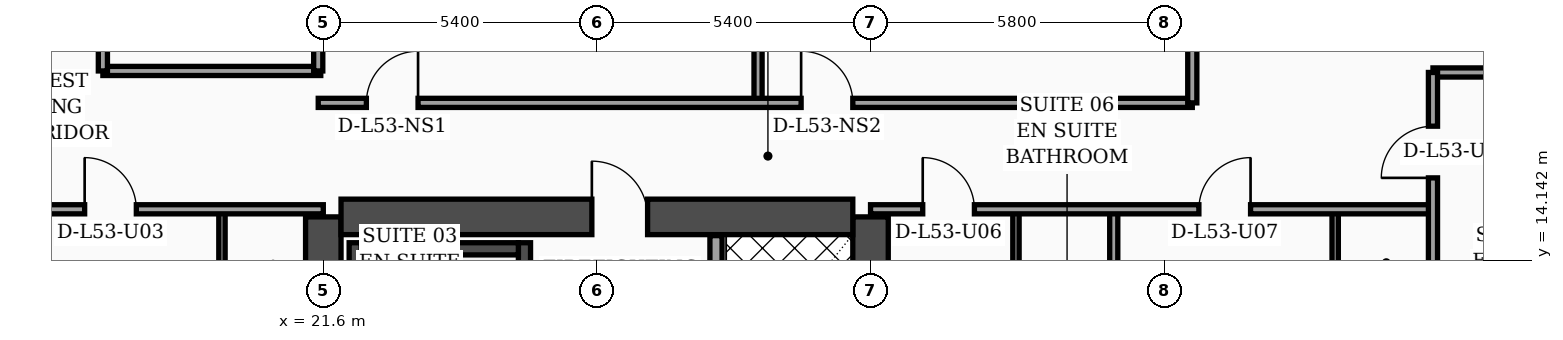
"""IFC4 building model, lengths in metres.
Left out: names, types, materials, properties, quantities, classifications, styles, units other than length and angle.
Written with IfcOpenShell. Run it as: python <this file> out.ifc"""

import sys

from ifc_helpers import new_model, si_unit, direction, frame, frame_2d, origin, place, context, subcontext, project, spatial, rectangle, extrude, element, fill, save


model = new_model("IFC4")
c1 = context("Model", 3, precision=1e-05, world=origin(), true_north=direction((0.0, 1.0)))
c2 = subcontext(c1, "Body", "Model", "MODEL_VIEW")
j1 = project(units=[si_unit("LENGTHUNIT", "METRE"), si_unit("PLANEANGLEUNIT", "RADIAN")], contexts=[c1])
p1 = place(None, origin())
s1 = spatial("IfcSite", under=j1, at=p1, CompositionType="ELEMENT")
p2 = place(p1, origin())
s2 = spatial("IfcBuilding", under=s1, at=p2, CompositionType="ELEMENT")
p3 = place(p2, frame((0.0, 0.0, 214.8)))
s3 = spatial("IfcBuildingStorey", under=s2, at=p3, CompositionType="ELEMENT", Elevation=214.8)
for number, where, z_axis, x_axis in (
    (1, (21.6, 4.6, 0.0), (0.0, 0.0, 1.0), (0.0, 1.0, 0.0)),
    (2, (32.4, 4.6, 0.0), (0.0, 0.0, 1.0), (0.0, 1.0, 0.0)),
):
    element("IfcWall", number, at=place(p3, frame(where, z_axis=z_axis, x_axis=x_axis)), inside=s3, PredefinedType="SHEAR", context=c2, shape_type="SweptSolid", body=[
        extrude(rectangle(XDim=10.4, YDim=0.7, at=frame_2d((5.2, 0.0))), origin(), (0.0, 0.0, 1.0), 4.05),
    ])
p4 = place(p3, frame((21.95, 15.0, 0.0), z_axis=(0.0, 0.0, 1.0), x_axis=(1.0, 0.0, 0.0)))
e3 = element("IfcWall", 3, at=p4, inside=s3, PredefinedType="SHEAR", context=c2, shape_type="SweptSolid", body=[
    extrude(rectangle(XDim=10.1, YDim=0.7, at=frame_2d((5.05, 0.0))), origin(), (0.0, 0.0, 1.0), 4.05),
])
p5 = place(p4, frame((4.95, 0.0, 0.0)))
e4 = element("IfcOpeningElement", 4, at=p5, cuts=e3, PredefinedType="OPENING", context=c2, shape_type="SweptSolid", body=[
    extrude(rectangle(XDim=1.1, YDim=2.2, at=frame_2d((0.55, 1.1))), frame((0.0, 0.36, 0.0), z_axis=(0.0, -1.0, 0.0), x_axis=(1.0, 0.0, 0.0)), (0.0, 0.0, 1.0), 0.72),
])
p6 = place(p3, frame((22.23, 4.95, 0.0), z_axis=(0.0, 0.0, 1.0), x_axis=(0.0, 1.0, 0.0)))
e5 = element("IfcWall", 5, at=p6, inside=s3, PredefinedType="SOLIDWALL", context=c2, shape_type="SweptSolid", body=[
    extrude(rectangle(XDim=9.54, YDim=0.24, at=frame_2d((4.77, 0.0))), origin(), (0.0, 0.0, 1.0), 4.05),
])
p7 = place(p3, frame((25.57, 4.95, 0.0), z_axis=(0.0, 0.0, 1.0), x_axis=(0.0, 1.0, 0.0)))
e6 = element("IfcWall", 6, at=p7, inside=s3, PredefinedType="SOLIDWALL", context=c2, shape_type="SweptSolid", body=[
    extrude(rectangle(XDim=9.54, YDim=0.24, at=frame_2d((4.77, 0.0))), origin(), (0.0, 0.0, 1.0), 4.05),
])
p8 = place(p7, frame((0.35, 0.0, 0.0)))
e7 = element("IfcOpeningElement", 7, at=p8, cuts=e6, PredefinedType="OPENING", context=c2, shape_type="SweptSolid", body=[
    extrude(rectangle(XDim=1.15, YDim=2.2, at=frame_2d((0.575, 1.1))), frame((0.0, 0.13, 0.0), z_axis=(0.0, -1.0, 0.0), x_axis=(1.0, 0.0, 0.0)), (0.0, 0.0, 1.0), 0.26),
])
p9 = place(p3, frame((22.35, 14.37, 0.0), z_axis=(0.0, 0.0, 1.0), x_axis=(1.0, 0.0, 0.0)))
e8 = element("IfcWall", 8, at=p9, inside=s3, PredefinedType="SOLIDWALL", context=c2, shape_type="SweptSolid", body=[
    extrude(rectangle(XDim=3.1, YDim=0.24, at=frame_2d((1.55, 0.0))), origin(), (0.0, 0.0, 1.0), 4.05),
])
p10 = place(p3, frame((52.23, 5.505, 0.0), z_axis=(0.0, 0.0, 1.0), x_axis=(-0.300509063924, 0.953778958931, 0.0)))
e9 = element("IfcWall", 9, at=p10, inside=s3, PredefinedType="SOLIDWALL", context=c2, shape_type="SweptSolid", body=[
    extrude(rectangle(XDim=30.814, YDim=0.32, at=frame_2d((15.407, 0.0))), origin(), (0.0, 0.0, 1.0), 4.05),
])
p11 = place(p10, frame((4.747, 0.0, 0.0)))
e10 = element("IfcOpeningElement", 10, at=p11, cuts=e9, PredefinedType="OPENING", context=c2, shape_type="SweptSolid", body=[
    extrude(rectangle(XDim=1.4, YDim=2.25, at=frame_2d((0.7, 1.125))), frame((0.0, 0.17, 0.0), z_axis=(0.0, -1.0, 0.0), x_axis=(1.0, 0.0, 0.0)), (0.0, 0.0, 1.0), 0.34),
])
p12 = place(p10, frame((9.889, 0.0, 0.7)))
e11 = element("IfcOpeningElement", 11, at=p12, cuts=e9, PredefinedType="OPENING", context=c2, shape_type="SweptSolid", body=[
    extrude(rectangle(XDim=1.6, YDim=1.65, at=frame_2d((0.8, 0.825))), frame((0.0, 0.17, 0.0), z_axis=(0.0, -1.0, 0.0), x_axis=(1.0, 0.0, 0.0)), (0.0, 0.0, 1.0), 0.34),
])
p13 = place(p10, frame((18.696, 0.0, 0.7)))
e12 = element("IfcOpeningElement", 12, at=p13, cuts=e9, PredefinedType="OPENING", context=c2, shape_type="SweptSolid", body=[
    extrude(rectangle(XDim=1.6, YDim=1.65, at=frame_2d((0.8, 0.825))), frame((0.0, 0.17, 0.0), z_axis=(0.0, -1.0, 0.0), x_axis=(1.0, 0.0, 0.0)), (0.0, 0.0, 1.0), 0.34),
])
p14 = place(p10, frame((2.65, 0.0, 0.75)))
e13 = element("IfcOpeningElement", 13, at=p14, cuts=e9, PredefinedType="OPENING", context=c2, shape_type="SweptSolid", body=[
    extrude(rectangle(XDim=1.5, YDim=1.6, at=frame_2d((0.75, 0.8))), frame((0.0, 0.17, 0.0), z_axis=(0.0, -1.0, 0.0), x_axis=(1.0, 0.0, 0.0)), (0.0, 0.0, 1.0), 0.34),
])
p15 = place(p10, frame((7.8, 0.0, 0.75)))
e14 = element("IfcOpeningElement", 14, at=p15, cuts=e9, PredefinedType="OPENING", context=c2, shape_type="SweptSolid", body=[
    extrude(rectangle(XDim=1.5, YDim=1.6, at=frame_2d((0.75, 0.8))), frame((0.0, 0.17, 0.0), z_axis=(0.0, -1.0, 0.0), x_axis=(1.0, 0.0, 0.0)), (0.0, 0.0, 1.0), 0.34),
])
p16 = place(p10, frame((14.0, 0.0, 0.75)))
e15 = element("IfcOpeningElement", 15, at=p16, cuts=e9, PredefinedType="OPENING", context=c2, shape_type="SweptSolid", body=[
    extrude(rectangle(XDim=1.5, YDim=1.6, at=frame_2d((0.75, 0.8))), frame((0.0, 0.17, 0.0), z_axis=(0.0, -1.0, 0.0), x_axis=(1.0, 0.0, 0.0)), (0.0, 0.0, 1.0), 0.34),
])
p17 = place(p10, frame((16.55, 0.0, 0.75)))
e16 = element("IfcOpeningElement", 16, at=p17, cuts=e9, PredefinedType="OPENING", context=c2, shape_type="SweptSolid", body=[
    extrude(rectangle(XDim=1.5, YDim=1.6, at=frame_2d((0.75, 0.8))), frame((0.0, 0.17, 0.0), z_axis=(0.0, -1.0, 0.0), x_axis=(1.0, 0.0, 0.0)), (0.0, 0.0, 1.0), 0.34),
])
p18 = place(p10, frame((20.75, 0.0, 0.75)))
e17 = element("IfcOpeningElement", 17, at=p18, cuts=e9, PredefinedType="OPENING", context=c2, shape_type="SweptSolid", body=[
    extrude(rectangle(XDim=1.5, YDim=1.6, at=frame_2d((0.75, 0.8))), frame((0.0, 0.17, 0.0), z_axis=(0.0, -1.0, 0.0), x_axis=(1.0, 0.0, 0.0)), (0.0, 0.0, 1.0), 0.34),
])
p19 = place(p10, frame((23.3, 0.0, 0.75)))
e18 = element("IfcOpeningElement", 18, at=p19, cuts=e9, PredefinedType="OPENING", context=c2, shape_type="SweptSolid", body=[
    extrude(rectangle(XDim=1.5, YDim=1.6, at=frame_2d((0.75, 0.8))), frame((0.0, 0.17, 0.0), z_axis=(0.0, -1.0, 0.0), x_axis=(1.0, 0.0, 0.0)), (0.0, 0.0, 1.0), 0.34),
])
p20 = place(p10, frame((26.4, 0.0, 0.75)))
e19 = element("IfcOpeningElement", 19, at=p20, cuts=e9, PredefinedType="OPENING", context=c2, shape_type="SweptSolid", body=[
    extrude(rectangle(XDim=1.5, YDim=1.6, at=frame_2d((0.75, 0.8))), frame((0.0, 0.17, 0.0), z_axis=(0.0, -1.0, 0.0), x_axis=(1.0, 0.0, 0.0)), (0.0, 0.0, 1.0), 0.34),
])
p21 = place(p3, frame((29.35, 4.97, 0.0), z_axis=(0.0, 0.0, 1.0), x_axis=(0.0, 1.0, 0.0)))
e20 = element("IfcWall", 20, at=p21, inside=s3, PredefinedType="SOLIDWALL", context=c2, shape_type="SweptSolid", body=[
    extrude(rectangle(XDim=9.66, YDim=0.24, at=frame_2d((4.83, 0.0))), origin(), (0.0, 0.0, 1.0), 4.05),
])
p22 = place(p21, frame((0.55, 0.0, 0.0)))
e21 = element("IfcOpeningElement", 21, at=p22, cuts=e20, PredefinedType="OPENING", context=c2, shape_type="SweptSolid", body=[
    extrude(rectangle(XDim=1.3, YDim=2.35, at=frame_2d((0.65, 1.175))), frame((0.0, 0.13, 0.0), z_axis=(0.0, -1.0, 0.0), x_axis=(1.0, 0.0, 0.0)), (0.0, 0.0, 1.0), 0.26),
])
p23 = place(p3, frame((19.6, 2.44, 0.0), z_axis=(0.0, 0.0, 1.0), x_axis=(0.0, 1.0, 0.0)))
e22 = element("IfcWall", 22, at=p23, inside=s3, PredefinedType="PARTITIONING", context=c2, shape_type="SweptSolid", body=[
    extrude(rectangle(XDim=12.71, YDim=0.125, at=frame_2d((6.355, 0.0))), origin(), (0.0, 0.0, 1.0), 2.35),
])
p24 = place(p23, frame((4.34, 0.0, 0.0)))
e23 = element("IfcOpeningElement", 23, at=p24, cuts=e22, PredefinedType="OPENING", context=c2, shape_type="SweptSolid", body=[
    extrude(rectangle(XDim=0.96, YDim=2.2, at=frame_2d((0.48, 1.1))), frame((0.0, 0.073, 0.0), z_axis=(0.0, -1.0, 0.0), x_axis=(1.0, 0.0, 0.0)), (0.0, 0.0, 1.0), 0.145),
])
p25 = place(p23, frame((10.18, 0.0, 0.0)))
e24 = element("IfcOpeningElement", 24, at=p25, cuts=e22, PredefinedType="OPENING", context=c2, shape_type="SweptSolid", body=[
    extrude(rectangle(XDim=0.9, YDim=2.15, at=frame_2d((0.45, 1.075))), frame((0.0, 0.073, 0.0), z_axis=(0.0, -1.0, 0.0), x_axis=(1.0, 0.0, 0.0)), (0.0, 0.0, 1.0), 0.145),
])
p26 = place(p3, frame((15.15, 15.15, 0.0), z_axis=(0.0, 0.0, 1.0), x_axis=(1.0, 0.0, 0.0)))
e25 = element("IfcWall", 25, at=p26, inside=s3, PredefinedType="PARTITIONING", context=c2, shape_type="SweptSolid", body=[
    extrude(rectangle(XDim=6.45, YDim=0.18, at=frame_2d((3.225, 0.0))), origin(), (0.0, 0.0, 1.0), 2.35),
])
p27 = place(p26, frame((1.74, 0.0, 0.0)))
e26 = element("IfcOpeningElement", 26, at=p27, cuts=e25, PredefinedType="OPENING", context=c2, shape_type="SweptSolid", body=[
    extrude(rectangle(XDim=1.02, YDim=2.2, at=frame_2d((0.51, 1.1))), frame((0.0, 0.1, 0.0), z_axis=(0.0, -1.0, 0.0), x_axis=(1.0, 0.0, 0.0)), (0.0, 0.0, 1.0), 0.2),
])
p28 = place(p3, frame((17.25, 17.88, 0.0), z_axis=(0.0, 0.0, 1.0), x_axis=(1.0, 0.0, 0.0)))
e27 = element("IfcWall", 27, at=p28, inside=s3, PredefinedType="PARTITIONING", context=c2, shape_type="SweptSolid", body=[
    extrude(rectangle(XDim=4.3, YDim=0.18, at=frame_2d((2.15, 0.0))), origin(), (0.0, 0.0, 1.0), 4.05),
])
p29 = place(p3, frame((21.5, 17.88, 0.0), z_axis=(0.0, 0.0, 1.0), x_axis=(0.0, 1.0, 0.0)))
e28 = element("IfcWall", 28, at=p29, inside=s3, PredefinedType="PARTITIONING", context=c2, shape_type="SweptSolid", body=[
    extrude(rectangle(XDim=6.44, YDim=0.18, at=frame_2d((3.22, 0.0))), origin(), (0.0, 0.0, 1.0), 4.05),
])
p30 = place(p3, frame((17.25, 17.88, 0.0), z_axis=(0.0, 0.0, 1.0), x_axis=(0.0, 1.0, 0.0)))
e29 = element("IfcWall", 29, at=p30, inside=s3, PredefinedType="PARTITIONING", context=c2, shape_type="SweptSolid", body=[
    extrude(rectangle(XDim=6.44, YDim=0.18, at=frame_2d((3.22, 0.0))), origin(), (0.0, 0.0, 1.0), 4.05),
])
p31 = place(p30, frame((0.65, 0.0, 0.0)))
e30 = element("IfcOpeningElement", 30, at=p31, cuts=e29, PredefinedType="OPENING", context=c2, shape_type="SweptSolid", body=[
    extrude(rectangle(XDim=0.98, YDim=2.15, at=frame_2d((0.49, 1.075))), frame((0.0, 0.1, 0.0), z_axis=(0.0, -1.0, 0.0), x_axis=(1.0, 0.0, 0.0)), (0.0, 0.0, 1.0), 0.2),
])
p32 = place(p30, frame((3.27, 0.0, 0.0)))
e31 = element("IfcOpeningElement", 31, at=p32, cuts=e29, PredefinedType="OPENING", context=c2, shape_type="SweptSolid", body=[
    extrude(rectangle(XDim=0.96, YDim=2.2, at=frame_2d((0.48, 1.1))), frame((0.0, 0.1, 0.0), z_axis=(0.0, -1.0, 0.0), x_axis=(1.0, 0.0, 0.0)), (0.0, 0.0, 1.0), 0.2),
])
p33 = place(p3, frame((35.27, 2.44, 0.0), z_axis=(0.0, 0.0, 1.0), x_axis=(0.0, 1.0, 0.0)))
e32 = element("IfcWall", 32, at=p33, inside=s3, PredefinedType="PARTITIONING", context=c2, shape_type="SweptSolid", body=[
    extrude(rectangle(XDim=12.71, YDim=0.125, at=frame_2d((6.355, 0.0))), origin(), (0.0, 0.0, 1.0), 2.35),
])
p34 = place(p33, frame((4.35, 0.0, 0.0)))
e33 = element("IfcOpeningElement", 33, at=p34, cuts=e32, PredefinedType="OPENING", context=c2, shape_type="SweptSolid", body=[
    extrude(rectangle(XDim=0.96, YDim=2.2, at=frame_2d((0.48, 1.1))), frame((0.0, 0.073, 0.0), z_axis=(0.0, -1.0, 0.0), x_axis=(1.0, 0.0, 0.0)), (0.0, 0.0, 1.0), 0.145),
])
p35 = place(p33, frame((10.21, 0.0, 0.0)))
e34 = element("IfcOpeningElement", 34, at=p35, cuts=e32, PredefinedType="OPENING", context=c2, shape_type="SweptSolid", body=[
    extrude(rectangle(XDim=0.9, YDim=2.15, at=frame_2d((0.45, 1.075))), frame((0.0, 0.073, 0.0), z_axis=(0.0, -1.0, 0.0), x_axis=(1.0, 0.0, 0.0)), (0.0, 0.0, 1.0), 0.145),
])
p36 = place(p3, frame((41.57, 2.44, 0.0), z_axis=(0.0, 0.0, 1.0), x_axis=(0.0, 1.0, 0.0)))
e35 = element("IfcWall", 35, at=p36, inside=s3, PredefinedType="PARTITIONING", context=c2, shape_type="SweptSolid", body=[
    extrude(rectangle(XDim=12.71, YDim=0.125, at=frame_2d((6.355, 0.0))), origin(), (0.0, 0.0, 1.0), 2.35),
])
p37 = place(p36, frame((4.35, 0.0, 0.0)))
e36 = element("IfcOpeningElement", 36, at=p37, cuts=e35, PredefinedType="OPENING", context=c2, shape_type="SweptSolid", body=[
    extrude(rectangle(XDim=0.96, YDim=2.2, at=frame_2d((0.48, 1.1))), frame((0.0, 0.073, 0.0), z_axis=(0.0, -1.0, 0.0), x_axis=(1.0, 0.0, 0.0)), (0.0, 0.0, 1.0), 0.145),
])
p38 = place(p36, frame((10.21, 0.0, 0.0)))
e37 = element("IfcOpeningElement", 37, at=p38, cuts=e35, PredefinedType="OPENING", context=c2, shape_type="SweptSolid", body=[
    extrude(rectangle(XDim=0.9, YDim=2.15, at=frame_2d((0.45, 1.075))), frame((0.0, 0.073, 0.0), z_axis=(0.0, -1.0, 0.0), x_axis=(1.0, 0.0, 0.0)), (0.0, 0.0, 1.0), 0.145),
])
p39 = place(p3, frame((37.2, 2.44, 0.0), z_axis=(0.0, 0.0, 1.0), x_axis=(0.0, 1.0, 0.0)))
e38 = element("IfcWall", 38, at=p39, inside=s3, PredefinedType="PARTITIONING", context=c2, shape_type="SweptSolid", body=[
    extrude(rectangle(XDim=12.71, YDim=0.16, at=frame_2d((6.355, 0.0))), origin(), (0.0, 0.0, 1.0), 2.35),
])
p40 = place(p3, frame((32.4, 15.15, 0.0), z_axis=(0.0, 0.0, 1.0), x_axis=(1.0, 0.0, 0.0)))
e39 = element("IfcWall", 39, at=p40, inside=s3, PredefinedType="PARTITIONING", context=c2, shape_type="SweptSolid", body=[
    extrude(rectangle(XDim=11.1, YDim=0.18, at=frame_2d((5.55, 0.0))), origin(), (0.0, 0.0, 1.0), 2.35),
])
p41 = place(p40, frame((1.03, 0.0, 0.0)))
e40 = element("IfcOpeningElement", 40, at=p41, cuts=e39, PredefinedType="OPENING", context=c2, shape_type="SweptSolid", body=[
    extrude(rectangle(XDim=1.02, YDim=2.2, at=frame_2d((0.51, 1.1))), frame((0.0, 0.1, 0.0), z_axis=(0.0, -1.0, 0.0), x_axis=(1.0, 0.0, 0.0)), (0.0, 0.0, 1.0), 0.2),
])
p42 = place(p40, frame((6.48, 0.0, 0.0)))
e41 = element("IfcOpeningElement", 41, at=p42, cuts=e39, PredefinedType="OPENING", context=c2, shape_type="SweptSolid", body=[
    extrude(rectangle(XDim=1.02, YDim=2.2, at=frame_2d((0.51, 1.1))), frame((0.0, 0.1, 0.0), z_axis=(0.0, -1.0, 0.0), x_axis=(1.0, 0.0, 0.0)), (0.0, 0.0, 1.0), 0.2),
])
p43 = place(p3, frame((30.18, 17.25, 0.0), z_axis=(0.0, 0.0, 1.0), x_axis=(0.0, 1.0, 0.0)))
e42 = element("IfcWall", 42, at=p43, inside=s3, PredefinedType="PARTITIONING", context=c2, shape_type="SweptSolid", body=[
    extrude(rectangle(XDim=13.94, YDim=0.16, at=frame_2d((6.97, 0.0))), origin(), (0.0, 0.0, 1.0), 2.35),
])
p44 = place(p3, frame((21.5, 17.25, 0.0), z_axis=(0.0, 0.0, 1.0), x_axis=(1.0, 0.0, 0.0)))
e43 = element("IfcWall", 43, at=p44, inside=s3, PredefinedType="PARTITIONING", context=c2, shape_type="SweptSolid", body=[
    extrude(rectangle(XDim=17.25, YDim=0.18, at=frame_2d((8.625, 0.0))), origin(), (0.0, 0.0, 1.0), 2.35),
])
p45 = place(p44, frame((0.95, 0.0, 0.0)))
e44 = element("IfcOpeningElement", 44, at=p45, cuts=e43, PredefinedType="OPENING", context=c2, shape_type="SweptSolid", body=[
    extrude(rectangle(XDim=1.02, YDim=2.2, at=frame_2d((0.51, 1.1))), frame((0.0, 0.1, 0.0), z_axis=(0.0, -1.0, 0.0), x_axis=(1.0, 0.0, 0.0)), (0.0, 0.0, 1.0), 0.2),
])
p46 = place(p44, frame((9.53, 0.0, 0.0)))
e45 = element("IfcOpeningElement", 45, at=p46, cuts=e43, PredefinedType="OPENING", context=c2, shape_type="SweptSolid", body=[
    extrude(rectangle(XDim=1.02, YDim=2.2, at=frame_2d((0.51, 1.1))), frame((0.0, 0.1, 0.0), z_axis=(0.0, -1.0, 0.0), x_axis=(1.0, 0.0, 0.0)), (0.0, 0.0, 1.0), 0.2),
])
p47 = place(p3, frame((38.75, 17.25, 0.0), z_axis=(0.0, 0.0, 1.0), x_axis=(0.0, 1.0, 0.0)))
e46 = element("IfcWall", 46, at=p47, inside=s3, PredefinedType="PARTITIONING", context=c2, shape_type="SweptSolid", body=[
    extrude(rectangle(XDim=20.63, YDim=0.18, at=frame_2d((10.315, 0.0))), origin(), (0.0, 0.0, 1.0), 2.35),
])
p48 = place(p3, frame((43.5, 17.85, 0.0), z_axis=(0.0, 0.0, 1.0), x_axis=(1.0, 0.0, 0.0)))
e47 = element("IfcWall", 47, at=p48, inside=s3, PredefinedType="PARTITIONING", context=c2, shape_type="SweptSolid", body=[
    extrude(rectangle(XDim=4.78, YDim=0.18, at=frame_2d((2.39, 0.0))), origin(), (0.0, 0.0, 1.0), 2.35),
])
p49 = place(p3, frame((43.5, 2.44, 0.0), z_axis=(0.0, 0.0, 1.0), x_axis=(0.0, 1.0, 0.0)))
e48 = element("IfcWall", 48, at=p49, inside=s3, PredefinedType="PARTITIONING", context=c2, shape_type="SweptSolid", body=[
    extrude(rectangle(XDim=15.41, YDim=0.18, at=frame_2d((7.705, 0.0))), origin(), (0.0, 0.0, 1.0), 2.35),
])
p50 = place(p49, frame((13.33, 0.0, 0.0)))
e49 = element("IfcOpeningElement", 49, at=p50, cuts=e48, PredefinedType="OPENING", context=c2, shape_type="SweptSolid", body=[
    extrude(rectangle(XDim=1.02, YDim=2.2, at=frame_2d((0.51, 1.1))), frame((0.0, 0.1, 0.0), z_axis=(0.0, -1.0, 0.0), x_axis=(1.0, 0.0, 0.0)), (0.0, 0.0, 1.0), 0.2),
])
p51 = place(p27, origin())
e50 = element("IfcDoor", 50, at=p51, inside=s3, OperationType="SINGLE_SWING_LEFT", PredefinedType="DOOR", context=c2, shape_type="SweptSolid", body=[
    extrude(rectangle(XDim=1.02, YDim=2.2, at=frame_2d((0.51, 1.1))), frame((0.0, 0.025, 0.0), z_axis=(0.0, -1.0, 0.0), x_axis=(1.0, 0.0, 0.0)), (0.0, 0.0, 1.0), 0.05),
])
fill(e26, e50)
p52 = place(p41, origin())
e51 = element("IfcDoor", 51, at=p52, inside=s3, OperationType="SINGLE_SWING_LEFT", PredefinedType="DOOR", context=c2, shape_type="SweptSolid", body=[
    extrude(rectangle(XDim=1.02, YDim=2.2, at=frame_2d((0.51, 1.1))), frame((0.0, 0.025, 0.0), z_axis=(0.0, -1.0, 0.0), x_axis=(1.0, 0.0, 0.0)), (0.0, 0.0, 1.0), 0.05),
])
fill(e40, e51)
p53 = place(p42, origin())
e52 = element("IfcDoor", 52, at=p53, inside=s3, OperationType="SINGLE_SWING_RIGHT", PredefinedType="DOOR", context=c2, shape_type="SweptSolid", body=[
    extrude(rectangle(XDim=1.02, YDim=2.2, at=frame_2d((0.51, 1.1))), frame((0.0, 0.025, 0.0), z_axis=(0.0, -1.0, 0.0), x_axis=(1.0, 0.0, 0.0)), (0.0, 0.0, 1.0), 0.05),
])
fill(e41, e52)
p54 = place(p45, origin())
e53 = element("IfcDoor", 53, at=p54, inside=s3, OperationType="SINGLE_SWING_RIGHT", PredefinedType="DOOR", context=c2, shape_type="SweptSolid", body=[
    extrude(rectangle(XDim=1.02, YDim=2.2, at=frame_2d((0.51, 1.1))), frame((0.0, 0.025, 0.0), z_axis=(0.0, -1.0, 0.0), x_axis=(1.0, 0.0, 0.0)), (0.0, 0.0, 1.0), 0.05),
])
fill(e44, e53)
p55 = place(p46, origin())
e54 = element("IfcDoor", 54, at=p55, inside=s3, OperationType="SINGLE_SWING_LEFT", PredefinedType="DOOR", context=c2, shape_type="SweptSolid", body=[
    extrude(rectangle(XDim=1.02, YDim=2.2, at=frame_2d((0.51, 1.1))), frame((0.0, 0.025, 0.0), z_axis=(0.0, -1.0, 0.0), x_axis=(1.0, 0.0, 0.0)), (0.0, 0.0, 1.0), 0.05),
])
fill(e45, e54)
p56 = place(p50, origin())
e55 = element("IfcDoor", 55, at=p56, inside=s3, OperationType="SINGLE_SWING_LEFT", PredefinedType="DOOR", context=c2, shape_type="SweptSolid", body=[
    extrude(rectangle(XDim=1.02, YDim=2.2, at=frame_2d((0.51, 1.1))), frame((0.0, 0.025, 0.0), z_axis=(0.0, -1.0, 0.0), x_axis=(1.0, 0.0, 0.0)), (0.0, 0.0, 1.0), 0.05),
])
fill(e49, e55)
p57 = place(p5, origin())
e56 = element("IfcDoor", 56, at=p57, inside=s3, OperationType="SINGLE_SWING_LEFT", PredefinedType="DOOR", context=c2, shape_type="SweptSolid", body=[
    extrude(rectangle(XDim=1.1, YDim=2.2, at=frame_2d((0.55, 1.1))), frame((0.0, 0.025, 0.0), z_axis=(0.0, -1.0, 0.0), x_axis=(1.0, 0.0, 0.0)), (0.0, 0.0, 1.0), 0.05),
])
fill(e4, e56)
save(model, sys.argv[1])
